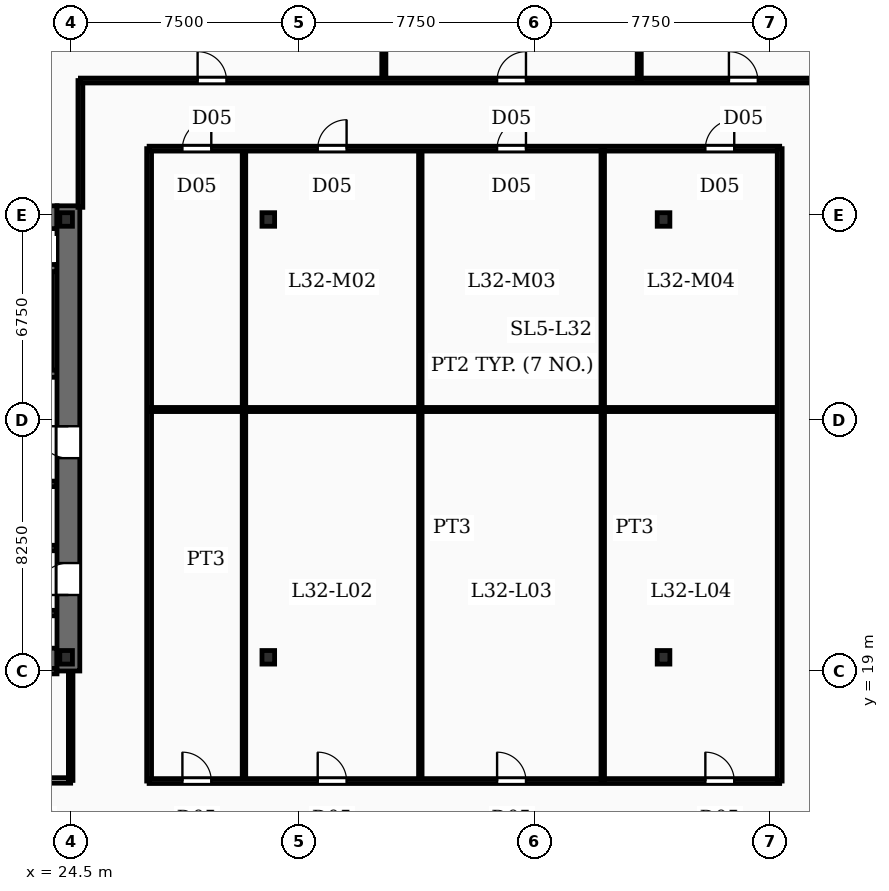
"""IFC4 building model, lengths in metres.
Left out: names, types, materials, properties, quantities, classifications, styles, units other than length and angle.
Written with IfcOpenShell. Run it as: python <this file> out.ifc"""

import sys

from ifc_helpers import new_model, si_unit, direction, frame, frame_2d, origin, origin_2d, place, context, subcontext, project, spatial, rectangle, i_section, extrude, element, fill, save


model = new_model("IFC4")
c1 = context("Model", 3, precision=1e-05, world=origin(), true_north=direction((0.0, 1.0)))
c2 = subcontext(c1, "Body", "Model", "MODEL_VIEW")
j1 = project(units=[si_unit("LENGTHUNIT", "METRE"), si_unit("PLANEANGLEUNIT", "RADIAN")], contexts=[c1])
p1 = place(None, origin())
s1 = spatial("IfcSite", under=j1, at=p1, CompositionType="ELEMENT")
p2 = place(p1, origin())
s2 = spatial("IfcBuilding", under=s1, at=p2, CompositionType="ELEMENT")
p3 = place(p2, frame((0.0, 0.0, 138.25)))
s3 = spatial("IfcBuildingStorey", under=s2, at=p3, CompositionType="ELEMENT", Elevation=138.25)
p4 = place(p3, frame((24.425, 19.0, -0.27), z_axis=(0.0, 0.0, 1.0), x_axis=(0.0, 1.0, 0.0)))
e1 = element("IfcWall", 1, at=p4, inside=s3, PredefinedType="SHEAR", context=c2, shape_type="SweptSolid", body=[
    extrude(rectangle(XDim=15.3, YDim=0.75, at=frame_2d((7.65, 0.0))), origin(), (0.0, 0.0, 1.0), 3.75),
])
p5 = place(p4, frame((2.5, 0.0, 0.27)))
e2 = element("IfcOpeningElement", 2, at=p5, cuts=e1, PredefinedType="OPENING", context=c2, shape_type="SweptSolid", body=[
    extrude(rectangle(XDim=1.05, YDim=2.15, at=frame_2d((0.525, 1.075))), frame((0.0, 0.385, 0.0), z_axis=(0.0, -1.0, 0.0), x_axis=(1.0, 0.0, 0.0)), (0.0, 0.0, 1.0), 0.77),
])
p6 = place(p4, frame((7.0, 0.0, 0.27)))
e3 = element("IfcOpeningElement", 3, at=p6, cuts=e1, PredefinedType="OPENING", context=c2, shape_type="SweptSolid", body=[
    extrude(rectangle(XDim=1.05, YDim=2.15, at=frame_2d((0.525, 1.075))), frame((0.0, 0.385, 0.0), z_axis=(0.0, -1.0, 0.0), x_axis=(1.0, 0.0, 0.0)), (0.0, 0.0, 1.0), 0.77),
])
for number, where, z_axis, x_axis in (
    (4, (14.85, 19.375, -0.27), (0.0, 0.0, 1.0), (1.0, 0.0, 0.0)),
    (5, (14.85, 33.925, -0.27), (0.0, 0.0, 1.0), (1.0, 0.0, 0.0)),
):
    element("IfcWall", number, at=place(p3, frame(where, z_axis=z_axis, x_axis=x_axis)), inside=s3, PredefinedType="SHEAR", context=c2, shape_type="SweptSolid", body=[
        extrude(rectangle(XDim=9.2, YDim=0.75, at=frame_2d((4.6, 0.0))), origin(), (0.0, 0.0, 1.0), 3.75),
    ])
for number, where, z_axis, x_axis in (
    (6, (24.35, 19.45, -0.27), (0.0, 0.0, 1.0), (1.0, 0.0, 0.0)),
    (7, (24.35, 33.85, -0.27), (0.0, 0.0, 1.0), (1.0, 0.0, 0.0)),
    (8, (31.0, 19.45, -0.27), (0.0, 0.0, 1.0), (1.0, 0.0, 0.0)),
    (9, (44.0, 19.45, -0.27), (0.0, 0.0, 1.0), (1.0, 0.0, 0.0)),
    (10, (31.0, 33.85, -0.27), (0.0, 0.0, 1.0), (1.0, 0.0, 0.0)),
    (11, (44.0, 33.85, -0.27), (0.0, 0.0, 1.0), (1.0, 0.0, 0.0)),
):
    element("IfcColumn", number, at=place(p3, frame(where, z_axis=z_axis, x_axis=x_axis)), inside=s3, PredefinedType="COLUMN", context=c2, shape_type="SweptSolid", body=[
        extrude(i_section(OverallWidth=0.416, OverallDepth=0.446, WebThickness=0.039, FlangeThickness=0.063, FilletRadius=0.02, at=origin_2d()), origin(), (0.0, 0.0, 1.0), 3.75),
    ])
p7 = place(p3, frame((24.05, 28.78, 0.0), z_axis=(0.0, 0.0, 1.0), x_axis=(-1.0, 0.0, 0.0)))
e12 = element("IfcWall", 12, at=p7, inside=s3, PredefinedType="SOLIDWALL", context=c2, shape_type="SweptSolid", body=[
    extrude(rectangle(XDim=9.2, YDim=0.24, at=frame_2d((4.6, 0.0))), origin(), (0.0, 0.0, 1.0), 3.48),
])
p8 = place(p7, frame((7.53, 0.0, 0.0)))
e13 = element("IfcOpeningElement", 13, at=p8, cuts=e12, PredefinedType="OPENING", context=c2, shape_type="SweptSolid", body=[
    extrude(rectangle(XDim=1.1, YDim=2.15, at=frame_2d((0.55, 1.075))), frame((0.0, 0.13, 0.0), z_axis=(0.0, -1.0, 0.0), x_axis=(1.0, 0.0, 0.0)), (0.0, 0.0, 1.0), 0.26),
])
p9 = place(p3, frame((14.85, 32.25, 0.0), z_axis=(0.0, 0.0, 1.0), x_axis=(1.0, 0.0, 0.0)))
e14 = element("IfcWall", 14, at=p9, inside=s3, PredefinedType="SOLIDWALL", context=c2, shape_type="SweptSolid", body=[
    extrude(rectangle(XDim=9.2, YDim=0.24, at=frame_2d((4.6, 0.0))), origin(), (0.0, 0.0, 1.0), 3.48),
])
p10 = place(p3, frame((23.78, 28.9, 0.0), z_axis=(0.0, 0.0, 1.0), x_axis=(0.0, 1.0, 0.0)))
e15 = element("IfcWall", 15, at=p10, inside=s3, PredefinedType="SOLIDWALL", context=c2, shape_type="SweptSolid", body=[
    extrude(rectangle(XDim=3.23, YDim=0.24, at=frame_2d((1.615, 0.0))), origin(), (0.0, 0.0, 1.0), 3.48),
])
p11 = place(p3, frame((20.9, 20.905, 0.0), z_axis=(0.0, 0.0, 1.0), x_axis=(1.0, 0.0, 0.0)))
e16 = element("IfcWall", 16, at=p11, inside=s3, PredefinedType="SOLIDWALL", context=c2, shape_type="SweptSolid", body=[
    extrude(rectangle(XDim=3.15, YDim=0.18, at=frame_2d((1.575, 0.0))), origin(), (0.0, 0.0, 1.0), 3.48),
])
p12 = place(p11, frame((0.7, 0.0, 0.0)))
e17 = element("IfcOpeningElement", 17, at=p12, cuts=e16, PredefinedType="OPENING", context=c2, shape_type="SweptSolid", body=[
    extrude(rectangle(XDim=1.2, YDim=2.2, at=frame_2d((0.6, 1.1))), frame((0.0, 0.1, 0.0), z_axis=(0.0, -1.0, 0.0), x_axis=(1.0, 0.0, 0.0)), (0.0, 0.0, 1.0), 0.2),
])
p13 = place(p3, frame((20.9, 18.995, 0.0), z_axis=(0.0, 0.0, 1.0), x_axis=(1.0, 0.0, 0.0)))
e18 = element("IfcWall", 18, at=p13, inside=s3, PredefinedType="SOLIDWALL", context=c2, shape_type="SweptSolid", body=[
    extrude(rectangle(XDim=3.15, YDim=0.18, at=frame_2d((1.575, 0.0))), origin(), (0.0, 0.0, 1.0), 3.48),
])
for number, where, z_axis, x_axis in (
    (19, (20.95, 25.155, 0.0), (0.0, 0.0, 1.0), (1.0, 0.0, 0.0)),
    (20, (20.95, 23.045, 0.0), (0.0, 0.0, 1.0), (1.0, 0.0, 0.0)),
):
    element("IfcWall", number, at=place(p3, frame(where, z_axis=z_axis, x_axis=x_axis)), inside=s3, PredefinedType="SOLIDWALL", context=c2, shape_type="SweptSolid", body=[
        extrude(rectangle(XDim=3.1, YDim=0.18, at=frame_2d((1.55, 0.0))), origin(), (0.0, 0.0, 1.0), 3.48),
    ])
p14 = place(p3, frame((14.6, 15.4, 0.0), z_axis=(0.0, 0.0, 1.0), x_axis=(1.0, 0.0, 0.0)))
e21 = element("IfcWall", 21, at=p14, inside=s3, PredefinedType="PARTITIONING", context=c2, shape_type="SweptSolid", body=[
    extrude(rectangle(XDim=9.9, YDim=0.18, at=frame_2d((4.95, 0.0))), origin(), (0.0, 0.0, 1.0), 2.54),
])
p15 = place(p14, frame((0.79, 0.0, 0.0)))
e22 = element("IfcOpeningElement", 22, at=p15, cuts=e21, PredefinedType="OPENING", context=c2, shape_type="SweptSolid", body=[
    extrude(rectangle(XDim=0.92, YDim=2.1, at=frame_2d((0.46, 1.05))), frame((0.0, 0.1, 0.0), z_axis=(0.0, -1.0, 0.0), x_axis=(1.0, 0.0, 0.0)), (0.0, 0.0, 1.0), 0.2),
])
p16 = place(p14, frame((3.29, 0.0, 0.0)))
e23 = element("IfcOpeningElement", 23, at=p16, cuts=e21, PredefinedType="OPENING", context=c2, shape_type="SweptSolid", body=[
    extrude(rectangle(XDim=0.92, YDim=2.1, at=frame_2d((0.46, 1.05))), frame((0.0, 0.1, 0.0), z_axis=(0.0, -1.0, 0.0), x_axis=(1.0, 0.0, 0.0)), (0.0, 0.0, 1.0), 0.2),
])
p17 = place(p14, frame((5.79, 0.0, 0.0)))
e24 = element("IfcOpeningElement", 24, at=p17, cuts=e21, PredefinedType="OPENING", context=c2, shape_type="SweptSolid", body=[
    extrude(rectangle(XDim=0.92, YDim=2.1, at=frame_2d((0.46, 1.05))), frame((0.0, 0.1, 0.0), z_axis=(0.0, -1.0, 0.0), x_axis=(1.0, 0.0, 0.0)), (0.0, 0.0, 1.0), 0.2),
])
p18 = place(p14, frame((8.24, 0.0, 0.0)))
e25 = element("IfcOpeningElement", 25, at=p18, cuts=e21, PredefinedType="OPENING", context=c2, shape_type="SweptSolid", body=[
    extrude(rectangle(XDim=0.92, YDim=2.1, at=frame_2d((0.46, 1.05))), frame((0.0, 0.1, 0.0), z_axis=(0.0, -1.0, 0.0), x_axis=(1.0, 0.0, 0.0)), (0.0, 0.0, 1.0), 0.2),
])
p19 = place(p3, frame((24.5, 15.4, 0.0), z_axis=(0.0, 0.0, 1.0), x_axis=(0.0, 1.0, 0.0)))
e26 = element("IfcWall", 26, at=p19, inside=s3, PredefinedType="PARTITIONING", context=c2, shape_type="SweptSolid", body=[
    extrude(rectangle(XDim=3.58, YDim=0.15, at=frame_2d((1.79, 0.0))), origin(), (0.0, 0.0, 1.0), 2.54),
])
p20 = place(p3, frame((34.8, 38.42, 0.0), z_axis=(0.0, 0.0, 1.0), x_axis=(0.0, 1.0, 0.0)))
e27 = element("IfcWall", 27, at=p20, inside=s3, PredefinedType="PARTITIONING", context=c2, shape_type="SweptSolid", body=[
    extrude(rectangle(XDim=14.271, YDim=0.135, at=frame_2d((7.136, 0.0))), origin(), (0.0, 0.0, 1.0), 2.54),
])
p21 = place(p3, frame((43.2, 38.42, 0.0), z_axis=(0.0, 0.0, 1.0), x_axis=(0.0, 1.0, 0.0)))
e28 = element("IfcWall", 28, at=p21, inside=s3, PredefinedType="PARTITIONING", context=c2, shape_type="SweptSolid", body=[
    extrude(rectangle(XDim=15.155, YDim=0.135, at=frame_2d((7.577, 0.0))), origin(), (0.0, 0.0, 1.0), 2.54),
])
p22 = place(p3, frame((24.82, 34.25, 0.0), z_axis=(0.0, 0.0, 1.0), x_axis=(0.0, 1.0, 0.0)))
e29 = element("IfcWall", 29, at=p22, inside=s3, PredefinedType="PARTITIONING", context=c2, shape_type="SweptSolid", body=[
    extrude(rectangle(XDim=4.17, YDim=0.16, at=frame_2d((2.085, 0.0))), origin(), (0.0, 0.0, 1.0), 2.54),
])
p23 = place(p3, frame((24.82, 38.42, 0.0), z_axis=(0.0, 0.0, 1.0), x_axis=(1.0, 0.0, 0.0)))
e30 = element("IfcWall", 30, at=p23, inside=s3, PredefinedType="PARTITIONING", context=c2, shape_type="SweptSolid", body=[
    extrude(rectangle(XDim=25.26, YDim=0.16, at=frame_2d((12.63, 0.0))), origin(), (0.0, 0.0, 1.0), 2.54),
])
p24 = place(p23, frame((3.855, 0.0, 0.0)))
e31 = element("IfcOpeningElement", 31, at=p24, cuts=e30, PredefinedType="OPENING", context=c2, shape_type="SweptSolid", body=[
    extrude(rectangle(XDim=0.95, YDim=2.15, at=frame_2d((0.475, 1.075))), frame((0.0, 0.09, 0.0), z_axis=(0.0, -1.0, 0.0), x_axis=(1.0, 0.0, 0.0)), (0.0, 0.0, 1.0), 0.18),
])
p25 = place(p23, frame((13.705, 0.0, 0.0)))
e32 = element("IfcOpeningElement", 32, at=p25, cuts=e30, PredefinedType="OPENING", context=c2, shape_type="SweptSolid", body=[
    extrude(rectangle(XDim=0.95, YDim=2.15, at=frame_2d((0.475, 1.075))), frame((0.0, 0.09, 0.0), z_axis=(0.0, -1.0, 0.0), x_axis=(1.0, 0.0, 0.0)), (0.0, 0.0, 1.0), 0.18),
])
p26 = place(p23, frame((21.33, 0.0, 0.0)))
e33 = element("IfcOpeningElement", 33, at=p26, cuts=e30, PredefinedType="OPENING", context=c2, shape_type="SweptSolid", body=[
    extrude(rectangle(XDim=0.95, YDim=2.15, at=frame_2d((0.475, 1.075))), frame((0.0, 0.09, 0.0), z_axis=(0.0, -1.0, 0.0), x_axis=(1.0, 0.0, 0.0)), (0.0, 0.0, 1.0), 0.18),
])
for number, where, z_axis, x_axis in (
    (34, (30.2, 15.38, 0.0), (0.0, 0.0, 1.0), (0.0, 1.0, 0.0)),
    (35, (36.0, 15.38, 0.0), (0.0, 0.0, 1.0), (0.0, 1.0, 0.0)),
    (36, (42.0, 15.38, 0.0), (0.0, 0.0, 1.0), (0.0, 1.0, 0.0)),
):
    element("IfcWall", number, at=place(p3, frame(where, z_axis=z_axis, x_axis=x_axis)), inside=s3, PredefinedType="PARTITIONING", context=c2, shape_type="SweptSolid", body=[
        extrude(rectangle(XDim=20.8, YDim=0.115, at=frame_2d((10.4, 0.0))), origin(), (0.0, 0.0, 1.0), 2.54),
    ])
p27 = place(p3, frame((27.08, 27.6, 0.0), z_axis=(0.0, 0.0, 1.0), x_axis=(1.0, 0.0, 0.0)))
e37 = element("IfcWall", 37, at=p27, inside=s3, PredefinedType="PARTITIONING", context=c2, shape_type="SweptSolid", body=[
    extrude(rectangle(XDim=20.74, YDim=0.135, at=frame_2d((10.37, 0.0))), origin(), (0.0, 0.0, 1.0), 2.54),
])
p28 = place(p3, frame((27.08, 36.18, 0.0), z_axis=(0.0, 0.0, 1.0), x_axis=(1.0, 0.0, 0.0)))
e38 = element("IfcWall", 38, at=p28, inside=s3, PredefinedType="PARTITIONING", context=c2, shape_type="SweptSolid", body=[
    extrude(rectangle(XDim=20.74, YDim=0.16, at=frame_2d((10.37, 0.0))), origin(), (0.0, 0.0, 1.0), 2.54),
])
p29 = place(p28, frame((1.095, 0.0, 0.0)))
e39 = element("IfcOpeningElement", 39, at=p29, cuts=e38, PredefinedType="OPENING", context=c2, shape_type="SweptSolid", body=[
    extrude(rectangle(XDim=0.95, YDim=2.15, at=frame_2d((0.475, 1.075))), frame((0.0, 0.09, 0.0), z_axis=(0.0, -1.0, 0.0), x_axis=(1.0, 0.0, 0.0)), (0.0, 0.0, 1.0), 0.18),
])
p30 = place(p28, frame((5.545, 0.0, 0.0)))
e40 = element("IfcOpeningElement", 40, at=p30, cuts=e38, PredefinedType="OPENING", context=c2, shape_type="SweptSolid", body=[
    extrude(rectangle(XDim=0.95, YDim=2.15, at=frame_2d((0.475, 1.075))), frame((0.0, 0.09, 0.0), z_axis=(0.0, -1.0, 0.0), x_axis=(1.0, 0.0, 0.0)), (0.0, 0.0, 1.0), 0.18),
])
p31 = place(p28, frame((11.445, 0.0, 0.0)))
e41 = element("IfcOpeningElement", 41, at=p31, cuts=e38, PredefinedType="OPENING", context=c2, shape_type="SweptSolid", body=[
    extrude(rectangle(XDim=0.95, YDim=2.15, at=frame_2d((0.475, 1.075))), frame((0.0, 0.09, 0.0), z_axis=(0.0, -1.0, 0.0), x_axis=(1.0, 0.0, 0.0)), (0.0, 0.0, 1.0), 0.18),
])
p32 = place(p28, frame((18.295, 0.0, 0.0)))
e42 = element("IfcOpeningElement", 42, at=p32, cuts=e38, PredefinedType="OPENING", context=c2, shape_type="SweptSolid", body=[
    extrude(rectangle(XDim=0.95, YDim=2.15, at=frame_2d((0.475, 1.075))), frame((0.0, 0.09, 0.0), z_axis=(0.0, -1.0, 0.0), x_axis=(1.0, 0.0, 0.0)), (0.0, 0.0, 1.0), 0.18),
])
p33 = place(p3, frame((27.08, 15.38, 0.0), z_axis=(0.0, 0.0, 1.0), x_axis=(1.0, 0.0, 0.0)))
e43 = element("IfcWall", 43, at=p33, inside=s3, PredefinedType="PARTITIONING", context=c2, shape_type="SweptSolid", body=[
    extrude(rectangle(XDim=20.74, YDim=0.16, at=frame_2d((10.37, 0.0))), origin(), (0.0, 0.0, 1.0), 2.54),
])
p34 = place(p33, frame((1.095, 0.0, 0.0)))
e44 = element("IfcOpeningElement", 44, at=p34, cuts=e43, PredefinedType="OPENING", context=c2, shape_type="SweptSolid", body=[
    extrude(rectangle(XDim=0.95, YDim=2.15, at=frame_2d((0.475, 1.075))), frame((0.0, 0.09, 0.0), z_axis=(0.0, -1.0, 0.0), x_axis=(1.0, 0.0, 0.0)), (0.0, 0.0, 1.0), 0.18),
])
p35 = place(p33, frame((5.545, 0.0, 0.0)))
e45 = element("IfcOpeningElement", 45, at=p35, cuts=e43, PredefinedType="OPENING", context=c2, shape_type="SweptSolid", body=[
    extrude(rectangle(XDim=0.95, YDim=2.15, at=frame_2d((0.475, 1.075))), frame((0.0, 0.09, 0.0), z_axis=(0.0, -1.0, 0.0), x_axis=(1.0, 0.0, 0.0)), (0.0, 0.0, 1.0), 0.18),
])
p36 = place(p33, frame((11.445, 0.0, 0.0)))
e46 = element("IfcOpeningElement", 46, at=p36, cuts=e43, PredefinedType="OPENING", context=c2, shape_type="SweptSolid", body=[
    extrude(rectangle(XDim=0.95, YDim=2.15, at=frame_2d((0.475, 1.075))), frame((0.0, 0.09, 0.0), z_axis=(0.0, -1.0, 0.0), x_axis=(1.0, 0.0, 0.0)), (0.0, 0.0, 1.0), 0.18),
])
p37 = place(p33, frame((18.295, 0.0, 0.0)))
e47 = element("IfcOpeningElement", 47, at=p37, cuts=e43, PredefinedType="OPENING", context=c2, shape_type="SweptSolid", body=[
    extrude(rectangle(XDim=0.95, YDim=2.15, at=frame_2d((0.475, 1.075))), frame((0.0, 0.09, 0.0), z_axis=(0.0, -1.0, 0.0), x_axis=(1.0, 0.0, 0.0)), (0.0, 0.0, 1.0), 0.18),
])
for number, where, z_axis, x_axis in (
    (48, (27.08, 15.38, 0.0), (0.0, 0.0, 1.0), (0.0, 1.0, 0.0)),
    (49, (47.82, 15.38, 0.0), (0.0, 0.0, 1.0), (0.0, 1.0, 0.0)),
):
    element("IfcWall", number, at=place(p3, frame(where, z_axis=z_axis, x_axis=x_axis)), inside=s3, PredefinedType="PARTITIONING", context=c2, shape_type="SweptSolid", body=[
        extrude(rectangle(XDim=20.8, YDim=0.16, at=frame_2d((10.4, 0.0))), origin(), (0.0, 0.0, 1.0), 2.54),
    ])
p38 = place(p5, origin())
e50 = element("IfcDoor", 50, at=p38, inside=s3, OperationType="SINGLE_SWING_LEFT", PredefinedType="DOOR", context=c2, shape_type="SweptSolid", body=[
    extrude(rectangle(XDim=1.05, YDim=2.15, at=frame_2d((0.525, 1.075))), frame((0.0, 0.025, 0.0), z_axis=(0.0, -1.0, 0.0), x_axis=(1.0, 0.0, 0.0)), (0.0, 0.0, 1.0), 0.05),
])
fill(e2, e50)
p39 = place(p6, origin())
e51 = element("IfcDoor", 51, at=p39, inside=s3, OperationType="SINGLE_SWING_RIGHT", PredefinedType="DOOR", context=c2, shape_type="SweptSolid", body=[
    extrude(rectangle(XDim=1.05, YDim=2.15, at=frame_2d((0.525, 1.075))), frame((0.0, 0.025, 0.0), z_axis=(0.0, -1.0, 0.0), x_axis=(1.0, 0.0, 0.0)), (0.0, 0.0, 1.0), 0.05),
])
fill(e3, e51)
p40 = place(p24, origin())
e52 = element("IfcDoor", 52, at=p40, inside=s3, OperationType="SINGLE_SWING_LEFT", PredefinedType="DOOR", context=c2, shape_type="SweptSolid", body=[
    extrude(rectangle(XDim=0.95, YDim=2.15, at=frame_2d((0.475, 1.075))), frame((0.0, 0.025, 0.0), z_axis=(0.0, -1.0, 0.0), x_axis=(1.0, 0.0, 0.0)), (0.0, 0.0, 1.0), 0.05),
])
fill(e31, e52)
p41 = place(p25, origin())
e53 = element("IfcDoor", 53, at=p41, inside=s3, OperationType="SINGLE_SWING_RIGHT", PredefinedType="DOOR", context=c2, shape_type="SweptSolid", body=[
    extrude(rectangle(XDim=0.95, YDim=2.15, at=frame_2d((0.475, 1.075))), frame((0.0, 0.025, 0.0), z_axis=(0.0, -1.0, 0.0), x_axis=(1.0, 0.0, 0.0)), (0.0, 0.0, 1.0), 0.05),
])
fill(e32, e53)
p42 = place(p26, origin())
e54 = element("IfcDoor", 54, at=p42, inside=s3, OperationType="SINGLE_SWING_LEFT", PredefinedType="DOOR", context=c2, shape_type="SweptSolid", body=[
    extrude(rectangle(XDim=0.95, YDim=2.15, at=frame_2d((0.475, 1.075))), frame((0.0, 0.025, 0.0), z_axis=(0.0, -1.0, 0.0), x_axis=(1.0, 0.0, 0.0)), (0.0, 0.0, 1.0), 0.05),
])
fill(e33, e54)
p43 = place(p29, origin())
e55 = element("IfcDoor", 55, at=p43, inside=s3, OperationType="SINGLE_SWING_RIGHT", PredefinedType="DOOR", context=c2, shape_type="SweptSolid", body=[
    extrude(rectangle(XDim=0.95, YDim=2.15, at=frame_2d((0.475, 1.075))), frame((0.0, 0.025, 0.0), z_axis=(0.0, -1.0, 0.0), x_axis=(1.0, 0.0, 0.0)), (0.0, 0.0, 1.0), 0.05),
])
fill(e39, e55)
p44 = place(p30, origin())
e56 = element("IfcDoor", 56, at=p44, inside=s3, OperationType="SINGLE_SWING_RIGHT", PredefinedType="DOOR", context=c2, shape_type="SweptSolid", body=[
    extrude(rectangle(XDim=0.95, YDim=2.15, at=frame_2d((0.475, 1.075))), frame((0.0, 0.025, 0.0), z_axis=(0.0, -1.0, 0.0), x_axis=(1.0, 0.0, 0.0)), (0.0, 0.0, 1.0), 0.05),
])
fill(e40, e56)
p45 = place(p31, origin())
e57 = element("IfcDoor", 57, at=p45, inside=s3, OperationType="SINGLE_SWING_RIGHT", PredefinedType="DOOR", context=c2, shape_type="SweptSolid", body=[
    extrude(rectangle(XDim=0.95, YDim=2.15, at=frame_2d((0.475, 1.075))), frame((0.0, 0.025, 0.0), z_axis=(0.0, -1.0, 0.0), x_axis=(1.0, 0.0, 0.0)), (0.0, 0.0, 1.0), 0.05),
])
fill(e41, e57)
p46 = place(p32, origin())
e58 = element("IfcDoor", 58, at=p46, inside=s3, OperationType="SINGLE_SWING_RIGHT", PredefinedType="DOOR", context=c2, shape_type="SweptSolid", body=[
    extrude(rectangle(XDim=0.95, YDim=2.15, at=frame_2d((0.475, 1.075))), frame((0.0, 0.025, 0.0), z_axis=(0.0, -1.0, 0.0), x_axis=(1.0, 0.0, 0.0)), (0.0, 0.0, 1.0), 0.05),
])
fill(e42, e58)
p47 = place(p34, origin())
e59 = element("IfcDoor", 59, at=p47, inside=s3, OperationType="SINGLE_SWING_LEFT", PredefinedType="DOOR", context=c2, shape_type="SweptSolid", body=[
    extrude(rectangle(XDim=0.95, YDim=2.15, at=frame_2d((0.475, 1.075))), frame((0.0, 0.025, 0.0), z_axis=(0.0, -1.0, 0.0), x_axis=(1.0, 0.0, 0.0)), (0.0, 0.0, 1.0), 0.05),
])
fill(e44, e59)
p48 = place(p35, origin())
e60 = element("IfcDoor", 60, at=p48, inside=s3, OperationType="SINGLE_SWING_LEFT", PredefinedType="DOOR", context=c2, shape_type="SweptSolid", body=[
    extrude(rectangle(XDim=0.95, YDim=2.15, at=frame_2d((0.475, 1.075))), frame((0.0, 0.025, 0.0), z_axis=(0.0, -1.0, 0.0), x_axis=(1.0, 0.0, 0.0)), (0.0, 0.0, 1.0), 0.05),
])
fill(e45, e60)
p49 = place(p36, origin())
e61 = element("IfcDoor", 61, at=p49, inside=s3, OperationType="SINGLE_SWING_LEFT", PredefinedType="DOOR", context=c2, shape_type="SweptSolid", body=[
    extrude(rectangle(XDim=0.95, YDim=2.15, at=frame_2d((0.475, 1.075))), frame((0.0, 0.025, 0.0), z_axis=(0.0, -1.0, 0.0), x_axis=(1.0, 0.0, 0.0)), (0.0, 0.0, 1.0), 0.05),
])
fill(e46, e61)
p50 = place(p37, origin())
e62 = element("IfcDoor", 62, at=p50, inside=s3, OperationType="SINGLE_SWING_LEFT", PredefinedType="DOOR", context=c2, shape_type="SweptSolid", body=[
    extrude(rectangle(XDim=0.95, YDim=2.15, at=frame_2d((0.475, 1.075))), frame((0.0, 0.025, 0.0), z_axis=(0.0, -1.0, 0.0), x_axis=(1.0, 0.0, 0.0)), (0.0, 0.0, 1.0), 0.05),
])
fill(e47, e62)
save(model, sys.argv[1])
